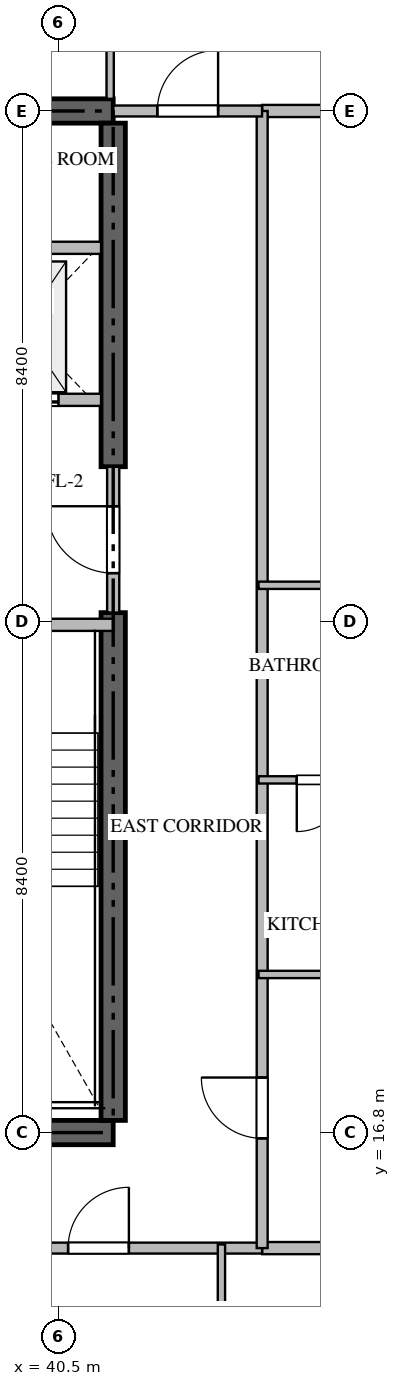
"""IFC4 building model, lengths in metres.
Left out: names, types, materials, properties, quantities, classifications, styles, units other than length and angle.
Written with IfcOpenShell. Run it as: python <this file> out.ifc"""

import sys

from ifc_helpers import new_model, si_unit, direction, frame, frame_2d, origin, place, context, subcontext, project, spatial, rectangle, extrude, source, transform, mapped, element, fill, save


model = new_model("IFC4")
c1 = context("Model", 3, precision=1e-05, world=origin(), true_north=direction((0.0, 1.0)))
c2 = subcontext(c1, "Body", "Model", "MODEL_VIEW")
j1 = project(units=[si_unit("LENGTHUNIT", "METRE"), si_unit("PLANEANGLEUNIT", "RADIAN")], contexts=[c1])
p1 = place(None, origin())
s1 = spatial("IfcSite", under=j1, at=p1, CompositionType="ELEMENT")
p2 = place(p1, origin())
s2 = spatial("IfcBuilding", under=s1, at=p2, CompositionType="ELEMENT")
p3 = place(p2, frame((0.0, 0.0, 161.4)))
s3 = spatial("IfcBuildingStorey", under=s2, at=p3, CompositionType="ELEMENT", Elevation=161.4)
for number, where, z_axis, x_axis in (
    (1, (23.4, 16.8, -0.26), (0.0, 0.0, 1.0), (1.0, 0.0, 0.0)),
    (2, (41.4, 33.6, -0.26), (0.0, 0.0, 1.0), (-1.0, 0.0, 0.0)),
):
    element("IfcWall", number, at=place(p3, frame(where, z_axis=z_axis, x_axis=x_axis)), inside=s3, PredefinedType="SHEAR", context=c2, shape_type="SweptSolid", body=[
        extrude(rectangle(XDim=18.0, YDim=0.4, at=frame_2d((9.0, 0.0))), origin(), (0.0, 0.0, 1.0), 3.748),
    ])
p4 = place(p3, frame((41.4, 17.0, -0.26), z_axis=(0.0, 0.0, 1.0), x_axis=(0.0, 1.0, 0.0)))
e3 = element("IfcWall", 3, at=p4, inside=s3, PredefinedType="SHEAR", context=c2, shape_type="SweptSolid", body=[
    extrude(rectangle(XDim=8.35, YDim=0.4, at=frame_2d((4.175, 0.0))), origin(), (0.0, 0.0, 1.0), 3.748),
])
p5 = place(p3, frame((41.4, 27.75, -0.26), z_axis=(0.0, 0.0, 1.0), x_axis=(0.0, 1.0, 0.0)))
e4 = element("IfcWall", 4, at=p5, inside=s3, PredefinedType="SHEAR", context=c2, shape_type="SweptSolid", body=[
    extrude(rectangle(XDim=5.65, YDim=0.4, at=frame_2d((2.825, 0.0))), origin(), (0.0, 0.0, 1.0), 3.748),
])
p6 = place(p3, frame((36.95, 25.15, 0.0), z_axis=(0.0, 0.0, 1.0), x_axis=(1.0, 0.0, 0.0)))
e5 = element("IfcWall", 5, at=p6, inside=s3, PredefinedType="STANDARD", context=c2, shape_type="SweptSolid", body=[
    extrude(rectangle(XDim=4.45, YDim=0.2, at=frame_2d((2.225, 0.0))), origin(), (0.0, 0.0, 1.0), 3.49),
])
p7 = place(p6, frame((1.65, 0.0, 0.0)))
e6 = element("IfcOpeningElement", 6, at=p7, cuts=e5, PredefinedType="OPENING", context=c2, shape_type="SweptSolid", body=[
    extrude(rectangle(XDim=1.1, YDim=2.15, at=frame_2d((0.55, 1.075))), frame((0.0, 0.11, 0.0), z_axis=(0.0, -1.0, 0.0), x_axis=(1.0, 0.0, 0.0)), (0.0, 0.0, 1.0), 0.22),
])
p8 = place(p3, frame((38.75, 28.85, 0.0), z_axis=(0.0, 0.0, 1.0), x_axis=(1.0, 0.0, 0.0)))
e7 = element("IfcWall", 7, at=p8, inside=s3, PredefinedType="STANDARD", context=c2, shape_type="SweptSolid", body=[
    extrude(rectangle(XDim=2.45, YDim=0.2, at=frame_2d((1.225, 0.0))), origin(), (0.0, 0.0, 1.0), 3.49),
])
p9 = place(p8, frame((0.55, 0.0, 0.0)))
e8 = element("IfcOpeningElement", 8, at=p9, cuts=e7, PredefinedType="OPENING", context=c2, shape_type="SweptSolid", body=[
    extrude(rectangle(XDim=1.2, YDim=2.2, at=frame_2d((0.6, 1.1))), frame((0.0, 0.11, 0.0), z_axis=(0.0, -1.0, 0.0), x_axis=(1.0, 0.0, 0.0)), (0.0, 0.0, 1.0), 0.22),
])
p10 = place(p3, frame((38.75, 31.35, 0.0), z_axis=(0.0, 0.0, 1.0), x_axis=(1.0, 0.0, 0.0)))
e9 = element("IfcWall", 9, at=p10, inside=s3, PredefinedType="STANDARD", context=c2, shape_type="SweptSolid", body=[
    extrude(rectangle(XDim=2.45, YDim=0.2, at=frame_2d((1.225, 0.0))), origin(), (0.0, 0.0, 1.0), 3.49),
])
p11 = place(p3, frame((41.4, 25.352, 0.0), z_axis=(0.0, 0.0, 1.0), x_axis=(0.0, 1.0, 0.0)))
e10 = element("IfcWall", 10, at=p11, inside=s3, PredefinedType="STANDARD", context=c2, shape_type="SweptSolid", body=[
    extrude(rectangle(XDim=2.396, YDim=0.2, at=frame_2d((1.198, 0.0))), origin(), (0.0, 0.0, 1.0), 3.49),
])
p12 = place(p11, frame((0.648, 0.0, 0.0)))
e11 = element("IfcOpeningElement", 11, at=p12, cuts=e10, PredefinedType="OPENING", context=c2, shape_type="SweptSolid", body=[
    extrude(rectangle(XDim=1.1, YDim=2.15, at=frame_2d((0.55, 1.075))), frame((0.0, 0.11, 0.0), z_axis=(0.0, -1.0, 0.0), x_axis=(1.0, 0.0, 0.0)), (0.0, 0.0, 1.0), 0.22),
])
for number, where, z_axis, x_axis in (
    (12, (43.85, 14.9, 0.0), (0.0, 0.0, 1.0), (1.0, 0.0, 0.0)),
    (13, (43.85, 33.6, 0.0), (0.0, 0.0, 1.0), (1.0, 0.0, 0.0)),
):
    element("IfcWall", number, at=place(p3, frame(where, z_axis=z_axis, x_axis=x_axis)), inside=s3, PredefinedType="PARTITIONING", context=c2, shape_type="SweptSolid", body=[
        extrude(rectangle(XDim=13.068, YDim=0.2, at=frame_2d((6.534, 0.0))), origin(), (0.0, 0.0, 1.0), 3.49),
    ])
p13 = place(p3, frame((20.952, 14.9, 0.0), z_axis=(0.0, 0.0, 1.0), x_axis=(1.0, 0.0, 0.0)))
e14 = element("IfcWall", 14, at=p13, inside=s3, PredefinedType="PARTITIONING", context=c2, shape_type="SweptSolid", body=[
    extrude(rectangle(XDim=22.896, YDim=0.18, at=frame_2d((11.448, 0.0))), origin(), (0.0, 0.0, 1.0), 3.49),
])
p14 = place(p13, frame((2.19, 0.0, 0.0)))
e15 = element("IfcOpeningElement", 15, at=p14, cuts=e14, PredefinedType="OPENING", context=c2, shape_type="SweptSolid", body=[
    extrude(rectangle(XDim=1.0, YDim=2.15, at=frame_2d((0.5, 1.075))), frame((0.0, 0.1, 0.0), z_axis=(0.0, -1.0, 0.0), x_axis=(1.0, 0.0, 0.0)), (0.0, 0.0, 1.0), 0.2),
])
p15 = place(p13, frame((15.24, 0.0, 0.0)))
e16 = element("IfcOpeningElement", 16, at=p15, cuts=e14, PredefinedType="OPENING", context=c2, shape_type="SweptSolid", body=[
    extrude(rectangle(XDim=1.0, YDim=2.15, at=frame_2d((0.5, 1.075))), frame((0.0, 0.1, 0.0), z_axis=(0.0, -1.0, 0.0), x_axis=(1.0, 0.0, 0.0)), (0.0, 0.0, 1.0), 0.2),
])
p16 = place(p13, frame((19.706, 0.0, 0.0)))
e17 = element("IfcOpeningElement", 17, at=p16, cuts=e14, PredefinedType="OPENING", context=c2, shape_type="SweptSolid", body=[
    extrude(rectangle(XDim=1.0, YDim=2.15, at=frame_2d((0.5, 1.075))), frame((0.0, 0.1, 0.0), z_axis=(0.0, -1.0, 0.0), x_axis=(1.0, 0.0, 0.0)), (0.0, 0.0, 1.0), 0.2),
])
p17 = place(p3, frame((43.85, 14.9, 0.0), z_axis=(0.0, 0.0, 1.0), x_axis=(0.0, 1.0, 0.0)))
e18 = element("IfcWall", 18, at=p17, inside=s3, PredefinedType="PARTITIONING", context=c2, shape_type="SweptSolid", body=[
    extrude(rectangle(XDim=18.7, YDim=0.18, at=frame_2d((9.35, 0.0))), origin(), (0.0, 0.0, 1.0), 3.49),
])
p18 = place(p17, frame((1.805, 0.0, 0.0)))
e19 = element("IfcOpeningElement", 19, at=p18, cuts=e18, PredefinedType="OPENING", context=c2, shape_type="SweptSolid", body=[
    extrude(rectangle(XDim=1.0, YDim=2.15, at=frame_2d((0.5, 1.075))), frame((0.0, 0.1, 0.0), z_axis=(0.0, -1.0, 0.0), x_axis=(1.0, 0.0, 0.0)), (0.0, 0.0, 1.0), 0.2),
])
p19 = place(p3, frame((41.402, 33.6, 0.0), z_axis=(0.0, 0.0, 1.0), x_axis=(1.0, 0.0, 0.0)))
e20 = element("IfcWall", 20, at=p19, inside=s3, PredefinedType="PARTITIONING", context=c2, shape_type="SweptSolid", body=[
    extrude(rectangle(XDim=2.446, YDim=0.18, at=frame_2d((1.223, 0.0))), origin(), (0.0, 0.0, 1.0), 3.49),
])
p20 = place(p19, frame((0.723, 0.0, 0.0)))
e21 = element("IfcOpeningElement", 21, at=p20, cuts=e20, PredefinedType="OPENING", context=c2, shape_type="SweptSolid", body=[
    extrude(rectangle(XDim=1.0, YDim=2.15, at=frame_2d((0.5, 1.075))), frame((0.0, 0.1, 0.0), z_axis=(0.0, -1.0, 0.0), x_axis=(1.0, 0.0, 0.0)), (0.0, 0.0, 1.0), 0.2),
])
p21 = place(p3, frame((43.18, 12.15, 0.0), z_axis=(0.0, 0.0, 1.0), x_axis=(0.0, 1.0, 0.0)))
e22 = element("IfcWall", 22, at=p21, inside=s3, PredefinedType="PARTITIONING", context=c2, shape_type="SweptSolid", body=[
    extrude(rectangle(XDim=2.81, YDim=0.12, at=frame_2d((1.405, 0.0))), origin(), (0.0, 0.0, 1.0), 3.49),
])
p22 = place(p3, frame((41.35, 36.35, 0.0), z_axis=(0.0, 0.0, 1.0), x_axis=(0.0, -1.0, 0.0)))
e23 = element("IfcWall", 23, at=p22, inside=s3, PredefinedType="PARTITIONING", context=c2, shape_type="SweptSolid", body=[
    extrude(rectangle(XDim=2.55, YDim=0.12, at=frame_2d((1.275, 0.0))), origin(), (0.0, 0.0, 1.0), 3.49),
])
p23 = place(p3, frame((46.6, 19.4, 0.0), z_axis=(0.0, 0.0, 1.0), x_axis=(-1.0, 0.0, 0.0)))
e24 = element("IfcWall", 24, at=p23, inside=s3, PredefinedType="PARTITIONING", context=c2, shape_type="SweptSolid", body=[
    extrude(rectangle(XDim=2.81, YDim=0.12, at=frame_2d((1.405, 0.0))), origin(), (0.0, 0.0, 1.0), 3.49),
])
p24 = place(p3, frame((45.9, 25.8, 0.0), z_axis=(0.0, 0.0, 1.0), x_axis=(-1.0, 0.0, 0.0)))
e25 = element("IfcWall", 25, at=p24, inside=s3, PredefinedType="PARTITIONING", context=c2, shape_type="SweptSolid", body=[
    extrude(rectangle(XDim=2.11, YDim=0.12, at=frame_2d((1.055, 0.0))), origin(), (0.0, 0.0, 1.0), 3.49),
])
p25 = place(p3, frame((45.898, 22.6, 0.0), z_axis=(0.0, 0.0, 1.0), x_axis=(-1.0, 0.0, 0.0)))
e26 = element("IfcWall", 26, at=p25, inside=s3, PredefinedType="PARTITIONING", context=c2, shape_type="SweptSolid", body=[
    extrude(rectangle(XDim=2.108, YDim=0.12, at=frame_2d((1.054, 0.0))), origin(), (0.0, 0.0, 1.0), 3.49),
])
p26 = place(p25, frame((0.629, 0.0, 0.0)))
e27 = element("IfcOpeningElement", 27, at=p26, cuts=e26, PredefinedType="OPENING", context=c2, shape_type="SweptSolid", body=[
    extrude(rectangle(XDim=0.85, YDim=2.1, at=frame_2d((0.425, 1.05))), frame((0.0, 0.07, 0.0), z_axis=(0.0, -1.0, 0.0), x_axis=(1.0, 0.0, 0.0)), (0.0, 0.0, 1.0), 0.14),
])
m1 = source(origin(), c2, "Body", "SweptSolid", [
    extrude(rectangle(XDim=1.2, YDim=2.2, at=frame_2d((0.6, 1.1))), frame((0.0, 0.025, 0.0), z_axis=(0.0, -1.0, 0.0), x_axis=(1.0, 0.0, 0.0)), (0.0, 0.0, 1.0), 0.05),
])
p27 = place(p9, origin())
e28 = element("IfcDoor", 28, at=p27, inside=s3, OperationType="DOUBLE_DOOR_SLIDING", PredefinedType="DOOR", context=c2, shape_type="MappedRepresentation", body=[
    mapped(m1, transform((0.0, 0.0, 0.0), scale=1.0)),
])
fill(e8, e28)
m2 = source(origin(), c2, "Body", "SweptSolid", [
    extrude(rectangle(XDim=1.1, YDim=2.15, at=frame_2d((0.55, 1.075))), frame((0.0, 0.025, 0.0), z_axis=(0.0, -1.0, 0.0), x_axis=(1.0, 0.0, 0.0)), (0.0, 0.0, 1.0), 0.05),
])
p28 = place(p12, origin())
e29 = element("IfcDoor", 29, at=p28, inside=s3, OperationType="SINGLE_SWING_RIGHT", PredefinedType="DOOR", context=c2, shape_type="MappedRepresentation", body=[
    mapped(m2, transform((0.0, 0.0, 0.0), scale=1.0)),
])
fill(e11, e29)
m3 = source(origin(), c2, "Body", "SweptSolid", [
    extrude(rectangle(XDim=1.0, YDim=2.15, at=frame_2d((0.5, 1.075))), frame((0.0, 0.025, 0.0), z_axis=(0.0, -1.0, 0.0), x_axis=(1.0, 0.0, 0.0)), (0.0, 0.0, 1.0), 0.05),
])
p29 = place(p16, origin())
e30 = element("IfcDoor", 30, at=p29, inside=s3, OperationType="SINGLE_SWING_RIGHT", PredefinedType="DOOR", context=c2, shape_type="MappedRepresentation", body=[
    mapped(m3, transform((0.0, 0.0, 0.0), scale=1.0)),
])
fill(e17, e30)
p30 = place(p18, origin())
e31 = element("IfcDoor", 31, at=p30, inside=s3, OperationType="SINGLE_SWING_RIGHT", PredefinedType="DOOR", context=c2, shape_type="MappedRepresentation", body=[
    mapped(m3, transform((0.0, 0.0, 0.0), scale=1.0)),
])
fill(e19, e31)
p31 = place(p20, origin())
e32 = element("IfcDoor", 32, at=p31, inside=s3, OperationType="SINGLE_SWING_RIGHT", PredefinedType="DOOR", context=c2, shape_type="MappedRepresentation", body=[
    mapped(m3, transform((0.0, 0.0, 0.0), scale=1.0)),
])
fill(e21, e32)
m4 = source(origin(), c2, "Body", "SweptSolid", [
    extrude(rectangle(XDim=0.85, YDim=2.1, at=frame_2d((0.425, 1.05))), frame((0.0, 0.025, 0.0), z_axis=(0.0, -1.0, 0.0), x_axis=(1.0, 0.0, 0.0)), (0.0, 0.0, 1.0), 0.05),
])
p32 = place(p26, origin())
e33 = element("IfcDoor", 33, at=p32, inside=s3, OperationType="SINGLE_SWING_RIGHT", PredefinedType="DOOR", context=c2, shape_type="MappedRepresentation", body=[
    mapped(m4, transform((0.0, 0.0, 0.0), scale=1.0)),
])
fill(e27, e33)
save(model, sys.argv[1])
